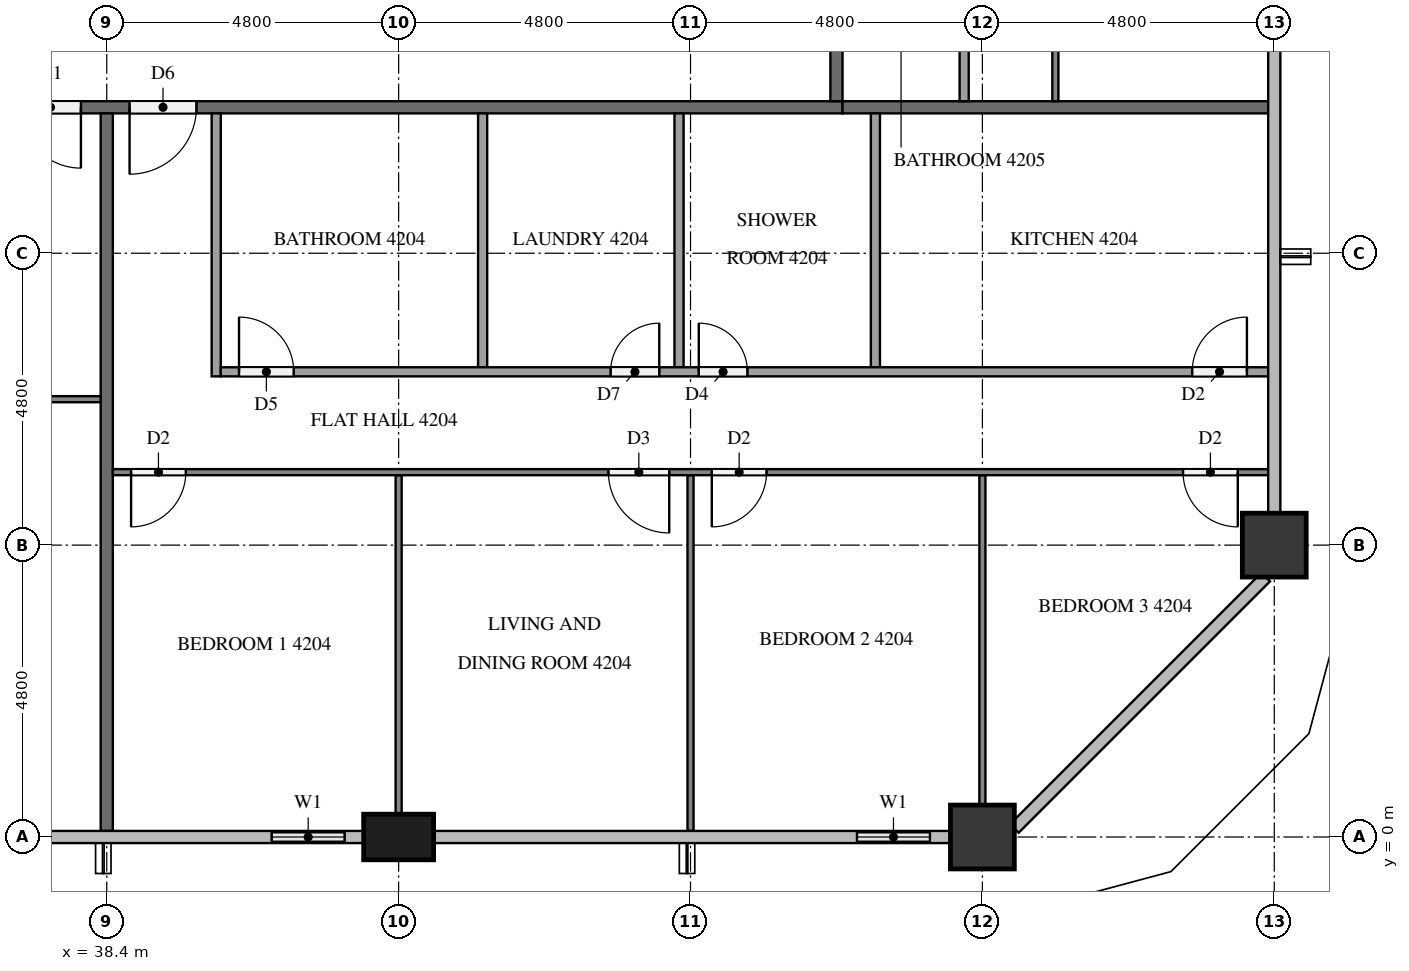
"""IFC4 building model, lengths in metres.
Left out: names, types, materials, properties, quantities, classifications, styles, units other than length and angle.
Written with IfcOpenShell. Run it as: python <this file> out.ifc"""

import sys

from ifc_helpers import new_model, si_unit, direction, frame, frame_2d, origin, origin_2d, place, context, subcontext, project, spatial, rectangle, extrude, element, fill, save


model = new_model("IFC4")
c1 = context("Model", 3, precision=1e-05, world=origin(), true_north=direction((0.0, 1.0)))
c2 = subcontext(c1, "Body", "Model", "MODEL_VIEW")
j1 = project(units=[si_unit("LENGTHUNIT", "METRE"), si_unit("PLANEANGLEUNIT", "RADIAN")], contexts=[c1])
p1 = place(None, origin())
s1 = spatial("IfcSite", under=j1, at=p1, CompositionType="ELEMENT")
p2 = place(p1, origin())
s2 = spatial("IfcBuilding", under=s1, at=p2, CompositionType="ELEMENT")
p3 = place(p2, frame((0.0, 0.0, 163.0)))
s3 = spatial("IfcBuildingStorey", under=s2, at=p3, CompositionType="ELEMENT", Elevation=163.0)
p4 = place(p3, frame((43.2, 0.0, 0.0), z_axis=(0.0, 0.0, 1.0), x_axis=(1.0, 0.0, 0.0)))
e1 = element("IfcColumn", 1, at=p4, inside=s3, PredefinedType="COLUMN", context=c2, shape_type="SweptSolid", body=[
    extrude(rectangle(XDim=1.15, YDim=0.75, at=origin_2d()), origin(), (0.0, 0.0, 1.0), 3.2),
])
for number, where, z_axis, x_axis in (
    (2, (52.8, 0.0, 0.0), (0.0, 0.0, 1.0), (1.0, 0.0, 0.0)),
    (3, (57.6, 4.8, 0.0), (0.0, 0.0, 1.0), (1.0, 0.0, 0.0)),
):
    element("IfcColumn", number, at=place(p3, frame(where, z_axis=z_axis, x_axis=x_axis)), inside=s3, PredefinedType="COLUMN", context=c2, shape_type="SweptSolid", body=[
        extrude(rectangle(XDim=1.05, YDim=1.05, at=origin_2d()), origin(), (0.0, 0.0, 1.0), 3.2),
    ])
p5 = place(p3, frame((40.8, 0.0, 0.0), z_axis=(0.0, 0.0, 1.0), x_axis=(1.0, 0.0, 0.0)))
e4 = element("IfcWall", 4, at=p5, inside=s3, PredefinedType="SOLIDWALL", context=c2, shape_type="SweptSolid", body=[
    extrude(rectangle(XDim=1.825, YDim=0.15, at=frame_2d((0.913, 0.0))), origin(), (0.0, 0.0, 1.0), 3.2),
])
p6 = place(p5, frame((0.312, 0.0, 0.9)))
e5 = element("IfcOpeningElement", 5, at=p6, cuts=e4, PredefinedType="OPENING", context=c2, shape_type="SweptSolid", body=[
    extrude(rectangle(XDim=1.2, YDim=1.4, at=frame_2d((0.6, 0.7))), frame((0.0, 0.085, 0.0), z_axis=(0.0, -1.0, 0.0), x_axis=(1.0, 0.0, 0.0)), (0.0, 0.0, 1.0), 0.17),
])
p7 = place(p3, frame((50.4, 0.0, 0.0), z_axis=(0.0, 0.0, 1.0), x_axis=(1.0, 0.0, 0.0)))
e6 = element("IfcWall", 6, at=p7, inside=s3, PredefinedType="SOLIDWALL", context=c2, shape_type="SweptSolid", body=[
    extrude(rectangle(XDim=1.875, YDim=0.15, at=frame_2d((0.938, 0.0))), origin(), (0.0, 0.0, 1.0), 3.2),
])
p8 = place(p7, frame((0.337, 0.0, 0.9)))
e7 = element("IfcOpeningElement", 7, at=p8, cuts=e6, PredefinedType="OPENING", context=c2, shape_type="SweptSolid", body=[
    extrude(rectangle(XDim=1.2, YDim=1.4, at=frame_2d((0.6, 0.7))), frame((0.0, 0.085, 0.0), z_axis=(0.0, -1.0, 0.0), x_axis=(1.0, 0.0, 0.0)), (0.0, 0.0, 1.0), 0.17),
])
p9 = place(p3, frame((50.5, 12.0, 0.0), z_axis=(0.0, 0.0, 1.0), x_axis=(-1.0, 0.0, 0.0)))
e8 = element("IfcWall", 8, at=p9, inside=s3, PredefinedType="PARTITIONING", context=c2, shape_type="SweptSolid", body=[
    extrude(rectangle(XDim=38.6, YDim=0.2, at=frame_2d((19.3, 0.0))), origin(), (0.0, 0.0, 1.0), 3.2),
])
p10 = place(p9, frame((34.125, 0.0, 0.0)))
e9 = element("IfcOpeningElement", 9, at=p10, cuts=e8, PredefinedType="OPENING", context=c2, shape_type="SweptSolid", body=[
    extrude(rectangle(XDim=1.0, YDim=2.1, at=frame_2d((0.5, 1.05))), frame((0.0, 0.11, 0.0), z_axis=(0.0, -1.0, 0.0), x_axis=(1.0, 0.0, 0.0)), (0.0, 0.0, 1.0), 0.22),
])
p11 = place(p9, frame((32.275, 0.0, 0.0)))
e10 = element("IfcOpeningElement", 10, at=p11, cuts=e8, PredefinedType="OPENING", context=c2, shape_type="SweptSolid", body=[
    extrude(rectangle(XDim=1.0, YDim=2.1, at=frame_2d((0.5, 1.05))), frame((0.0, 0.11, 0.0), z_axis=(0.0, -1.0, 0.0), x_axis=(1.0, 0.0, 0.0)), (0.0, 0.0, 1.0), 0.22),
])
p12 = place(p9, frame((12.525, 0.0, 0.0)))
e11 = element("IfcOpeningElement", 11, at=p12, cuts=e8, PredefinedType="OPENING", context=c2, shape_type="SweptSolid", body=[
    extrude(rectangle(XDim=1.0, YDim=2.1, at=frame_2d((0.5, 1.05))), frame((0.0, 0.11, 0.0), z_axis=(0.0, -1.0, 0.0), x_axis=(1.0, 0.0, 0.0)), (0.0, 0.0, 1.0), 0.22),
])
p13 = place(p9, frame((10.625, 0.0, 0.0)))
e12 = element("IfcOpeningElement", 12, at=p13, cuts=e8, PredefinedType="OPENING", context=c2, shape_type="SweptSolid", body=[
    extrude(rectangle(XDim=1.1, YDim=2.1, at=frame_2d((0.55, 1.05))), frame((0.0, 0.11, 0.0), z_axis=(0.0, -1.0, 0.0), x_axis=(1.0, 0.0, 0.0)), (0.0, 0.0, 1.0), 0.22),
])
p14 = place(p3, frame((50.4, 40.7, 0.0), z_axis=(0.0, 0.0, 1.0), x_axis=(0.0, -1.0, 0.0)))
e13 = element("IfcWall", 13, at=p14, inside=s3, PredefinedType="PARTITIONING", context=c2, shape_type="SweptSolid", body=[
    extrude(rectangle(XDim=28.6, YDim=0.2, at=frame_2d((14.3, 0.0))), origin(), (0.0, 0.0, 1.0), 3.2),
])
p15 = place(p14, frame((19.525, 0.0, 0.0)))
e14 = element("IfcOpeningElement", 14, at=p15, cuts=e13, PredefinedType="OPENING", context=c2, shape_type="SweptSolid", body=[
    extrude(rectangle(XDim=1.0, YDim=2.1, at=frame_2d((0.5, 1.05))), frame((0.0, 0.11, 0.0), z_axis=(0.0, -1.0, 0.0), x_axis=(1.0, 0.0, 0.0)), (0.0, 0.0, 1.0), 0.22),
])
p16 = place(p14, frame((17.675, 0.0, 0.0)))
e15 = element("IfcOpeningElement", 15, at=p16, cuts=e13, PredefinedType="OPENING", context=c2, shape_type="SweptSolid", body=[
    extrude(rectangle(XDim=1.0, YDim=2.1, at=frame_2d((0.5, 1.05))), frame((0.0, 0.11, 0.0), z_axis=(0.0, -1.0, 0.0), x_axis=(1.0, 0.0, 0.0)), (0.0, 0.0, 1.0), 0.22),
])
p17 = place(p14, frame((8.075, 0.0, 0.0)))
e16 = element("IfcOpeningElement", 16, at=p17, cuts=e13, PredefinedType="OPENING", context=c2, shape_type="SweptSolid", body=[
    extrude(rectangle(XDim=1.0, YDim=2.1, at=frame_2d((0.5, 1.05))), frame((0.0, 0.11, 0.0), z_axis=(0.0, -1.0, 0.0), x_axis=(1.0, 0.0, 0.0)), (0.0, 0.0, 1.0), 0.22),
])
p18 = place(p3, frame((38.4, 11.9, 0.0), z_axis=(0.0, 0.0, 1.0), x_axis=(0.0, -1.0, 0.0)))
e17 = element("IfcWall", 17, at=p18, inside=s3, PredefinedType="PARTITIONING", context=c2, shape_type="SweptSolid", body=[
    extrude(rectangle(XDim=11.8, YDim=0.2, at=frame_2d((5.9, 0.0))), origin(), (0.0, 0.0, 1.0), 3.2),
])
p19 = place(p3, frame((50.5, 12.0, 0.0), z_axis=(0.0, 0.0, 1.0), x_axis=(1.0, 0.0, 0.0)))
e18 = element("IfcWall", 18, at=p19, inside=s3, PredefinedType="PARTITIONING", context=c2, shape_type="SweptSolid", body=[
    extrude(rectangle(XDim=7.0, YDim=0.2, at=frame_2d((3.5, 0.0))), origin(), (0.0, 0.0, 1.0), 3.2),
])
p20 = place(p3, frame((38.3, 7.2, 0.0), z_axis=(0.0, 0.0, 1.0), x_axis=(-1.0, 0.0, 0.0)))
e19 = element("IfcWall", 19, at=p20, inside=s3, PredefinedType="PARTITIONING", context=c2, shape_type="SweptSolid", body=[
    extrude(rectangle(XDim=14.2, YDim=0.1, at=frame_2d((7.1, 0.0))), origin(), (0.0, 0.0, 1.0), 3.2),
])
p21 = place(p20, frame((3.45, 0.0, 0.0)))
e20 = element("IfcOpeningElement", 20, at=p21, cuts=e19, PredefinedType="OPENING", context=c2, shape_type="SweptSolid", body=[
    extrude(rectangle(XDim=0.9, YDim=2.1, at=frame_2d((0.45, 1.05))), frame((0.0, 0.06, 0.0), z_axis=(0.0, -1.0, 0.0), x_axis=(1.0, 0.0, 0.0)), (0.0, 0.0, 1.0), 0.12),
])
p22 = place(p20, frame((5.05, 0.0, 0.0)))
e21 = element("IfcOpeningElement", 21, at=p22, cuts=e19, PredefinedType="OPENING", context=c2, shape_type="SweptSolid", body=[
    extrude(rectangle(XDim=0.9, YDim=2.1, at=frame_2d((0.45, 1.05))), frame((0.0, 0.06, 0.0), z_axis=(0.0, -1.0, 0.0), x_axis=(1.0, 0.0, 0.0)), (0.0, 0.0, 1.0), 0.12),
])
p23 = place(p20, frame((12.9, 0.0, 0.0)))
e22 = element("IfcOpeningElement", 22, at=p23, cuts=e19, PredefinedType="OPENING", context=c2, shape_type="SweptSolid", body=[
    extrude(rectangle(XDim=1.0, YDim=2.1, at=frame_2d((0.5, 1.05))), frame((0.0, 0.06, 0.0), z_axis=(0.0, -1.0, 0.0), x_axis=(1.0, 0.0, 0.0)), (0.0, 0.0, 1.0), 0.12),
])
p24 = place(p3, frame((43.2, 5.95, 0.0), z_axis=(0.0, 0.0, 1.0), x_axis=(0.0, -1.0, 0.0)))
e23 = element("IfcWall", 23, at=p24, inside=s3, PredefinedType="PARTITIONING", context=c2, shape_type="SweptSolid", body=[
    extrude(rectangle(XDim=5.575, YDim=0.1, at=frame_2d((2.788, 0.0))), origin(), (0.0, 0.0, 1.0), 3.2),
])
p25 = place(p3, frame((48.0, 5.95, 0.0), z_axis=(0.0, 0.0, 1.0), x_axis=(0.0, -1.0, 0.0)))
e24 = element("IfcWall", 24, at=p25, inside=s3, PredefinedType="PARTITIONING", context=c2, shape_type="SweptSolid", body=[
    extrude(rectangle(XDim=5.85, YDim=0.1, at=frame_2d((2.925, 0.0))), origin(), (0.0, 0.0, 1.0), 3.2),
])
p26 = place(p3, frame((52.8, 5.95, 0.0), z_axis=(0.0, 0.0, 1.0), x_axis=(0.0, -1.0, 0.0)))
e25 = element("IfcWall", 25, at=p26, inside=s3, PredefinedType="PARTITIONING", context=c2, shape_type="SweptSolid", body=[
    extrude(rectangle(XDim=5.425, YDim=0.1, at=frame_2d((2.712, 0.0))), origin(), (0.0, 0.0, 1.0), 3.2),
])
p27 = place(p3, frame((57.5, 6.0, 0.0), z_axis=(0.0, 0.0, 1.0), x_axis=(-1.0, 0.0, 0.0)))
e26 = element("IfcWall", 26, at=p27, inside=s3, PredefinedType="PARTITIONING", context=c2, shape_type="SweptSolid", body=[
    extrude(rectangle(XDim=19.0, YDim=0.1, at=frame_2d((9.5, 0.0))), origin(), (0.0, 0.0, 1.0), 3.2),
])
p28 = place(p27, frame((17.8, 0.0, 0.0)))
e27 = element("IfcOpeningElement", 27, at=p28, cuts=e26, PredefinedType="OPENING", context=c2, shape_type="SweptSolid", body=[
    extrude(rectangle(XDim=0.9, YDim=2.1, at=frame_2d((0.45, 1.05))), frame((0.0, 0.06, 0.0), z_axis=(0.0, -1.0, 0.0), x_axis=(1.0, 0.0, 0.0)), (0.0, 0.0, 1.0), 0.12),
])
p29 = place(p27, frame((9.85, 0.0, 0.0)))
e28 = element("IfcOpeningElement", 28, at=p29, cuts=e26, PredefinedType="OPENING", context=c2, shape_type="SweptSolid", body=[
    extrude(rectangle(XDim=1.0, YDim=2.1, at=frame_2d((0.5, 1.05))), frame((0.0, 0.06, 0.0), z_axis=(0.0, -1.0, 0.0), x_axis=(1.0, 0.0, 0.0)), (0.0, 0.0, 1.0), 0.12),
])
p30 = place(p27, frame((8.25, 0.0, 0.0)))
e29 = element("IfcOpeningElement", 29, at=p30, cuts=e26, PredefinedType="OPENING", context=c2, shape_type="SweptSolid", body=[
    extrude(rectangle(XDim=0.9, YDim=2.1, at=frame_2d((0.45, 1.05))), frame((0.0, 0.06, 0.0), z_axis=(0.0, -1.0, 0.0), x_axis=(1.0, 0.0, 0.0)), (0.0, 0.0, 1.0), 0.12),
])
p31 = place(p27, frame((0.5, 0.0, 0.0)))
e30 = element("IfcOpeningElement", 30, at=p31, cuts=e26, PredefinedType="OPENING", context=c2, shape_type="SweptSolid", body=[
    extrude(rectangle(XDim=0.9, YDim=2.1, at=frame_2d((0.45, 1.05))), frame((0.0, 0.06, 0.0), z_axis=(0.0, -1.0, 0.0), x_axis=(1.0, 0.0, 0.0)), (0.0, 0.0, 1.0), 0.12),
])
for number, where, z_axis, x_axis in (
    (31, (44.581, 11.9, 0.0), (0.0, 0.0, 1.0), (0.0, -1.0, 0.0)),
    (32, (47.811, 11.9, 0.0), (0.0, 0.0, 1.0), (0.0, -1.0, 0.0)),
    (33, (51.041, 11.9, 0.0), (0.0, 0.0, 1.0), (0.0, -1.0, 0.0)),
):
    element("IfcWall", number, at=place(p3, frame(where, z_axis=z_axis, x_axis=x_axis)), inside=s3, PredefinedType="PARTITIONING", context=c2, shape_type="SweptSolid", body=[
        extrude(rectangle(XDim=4.175, YDim=0.15, at=frame_2d((2.087, 0.0))), origin(), (0.0, 0.0, 1.0), 3.2),
    ])
p32 = place(p3, frame((40.2, 11.9, 0.0), z_axis=(0.0, 0.0, 1.0), x_axis=(0.0, -1.0, 0.0)))
e34 = element("IfcWall", 34, at=p32, inside=s3, PredefinedType="PARTITIONING", context=c2, shape_type="SweptSolid", body=[
    extrude(rectangle(XDim=4.325, YDim=0.15, at=frame_2d((2.163, 0.0))), origin(), (0.0, 0.0, 1.0), 3.2),
])
p33 = place(p3, frame((40.275, 7.65, 0.0), z_axis=(0.0, 0.0, 1.0), x_axis=(1.0, 0.0, 0.0)))
e35 = element("IfcWall", 35, at=p33, inside=s3, PredefinedType="PARTITIONING", context=c2, shape_type="SweptSolid", body=[
    extrude(rectangle(XDim=17.225, YDim=0.15, at=frame_2d((8.613, 0.0))), origin(), (0.0, 0.0, 1.0), 3.2),
])
p34 = place(p33, frame((0.3, 0.0, 0.0)))
e36 = element("IfcOpeningElement", 36, at=p34, cuts=e35, PredefinedType="OPENING", context=c2, shape_type="SweptSolid", body=[
    extrude(rectangle(XDim=0.9, YDim=2.1, at=frame_2d((0.45, 1.05))), frame((0.0, 0.085, 0.0), z_axis=(0.0, -1.0, 0.0), x_axis=(1.0, 0.0, 0.0)), (0.0, 0.0, 1.0), 0.17),
])
p35 = place(p33, frame((6.411, 0.0, 0.0)))
e37 = element("IfcOpeningElement", 37, at=p35, cuts=e35, PredefinedType="OPENING", context=c2, shape_type="SweptSolid", body=[
    extrude(rectangle(XDim=0.8, YDim=2.1, at=frame_2d((0.4, 1.05))), frame((0.0, 0.085, 0.0), z_axis=(0.0, -1.0, 0.0), x_axis=(1.0, 0.0, 0.0)), (0.0, 0.0, 1.0), 0.17),
])
p36 = place(p33, frame((7.861, 0.0, 0.0)))
e38 = element("IfcOpeningElement", 38, at=p36, cuts=e35, PredefinedType="OPENING", context=c2, shape_type="SweptSolid", body=[
    extrude(rectangle(XDim=0.8, YDim=2.1, at=frame_2d((0.4, 1.05))), frame((0.0, 0.085, 0.0), z_axis=(0.0, -1.0, 0.0), x_axis=(1.0, 0.0, 0.0)), (0.0, 0.0, 1.0), 0.17),
])
p37 = place(p33, frame((15.975, 0.0, 0.0)))
e39 = element("IfcOpeningElement", 39, at=p37, cuts=e35, PredefinedType="OPENING", context=c2, shape_type="SweptSolid", body=[
    extrude(rectangle(XDim=0.9, YDim=2.1, at=frame_2d((0.45, 1.05))), frame((0.0, 0.085, 0.0), z_axis=(0.0, -1.0, 0.0), x_axis=(1.0, 0.0, 0.0)), (0.0, 0.0, 1.0), 0.17),
])
p38 = place(p3, frame((54.0, 21.5, 0.0), z_axis=(0.0, 0.0, 1.0), x_axis=(0.0, -1.0, 0.0)))
e40 = element("IfcWall", 40, at=p38, inside=s3, PredefinedType="PARTITIONING", context=c2, shape_type="SweptSolid", body=[
    extrude(rectangle(XDim=9.4, YDim=0.1, at=frame_2d((4.7, 0.0))), origin(), (0.0, 0.0, 1.0), 3.2),
])
p39 = place(p38, frame((3.35, 0.0, 0.0)))
e41 = element("IfcOpeningElement", 41, at=p39, cuts=e40, PredefinedType="OPENING", context=c2, shape_type="SweptSolid", body=[
    extrude(rectangle(XDim=1.0, YDim=2.1, at=frame_2d((0.5, 1.05))), frame((0.0, 0.06, 0.0), z_axis=(0.0, -1.0, 0.0), x_axis=(1.0, 0.0, 0.0)), (0.0, 0.0, 1.0), 0.12),
])
p40 = place(p38, frame((5.05, 0.0, 0.0)))
e42 = element("IfcOpeningElement", 42, at=p40, cuts=e40, PredefinedType="OPENING", context=c2, shape_type="SweptSolid", body=[
    extrude(rectangle(XDim=0.9, YDim=2.1, at=frame_2d((0.45, 1.05))), frame((0.0, 0.06, 0.0), z_axis=(0.0, -1.0, 0.0), x_axis=(1.0, 0.0, 0.0)), (0.0, 0.0, 1.0), 0.12),
])
p41 = place(p3, frame((52.5, 12.1, 0.0), z_axis=(0.0, 0.0, 1.0), x_axis=(0.0, 1.0, 0.0)))
e43 = element("IfcWall", 43, at=p41, inside=s3, PredefinedType="PARTITIONING", context=c2, shape_type="SweptSolid", body=[
    extrude(rectangle(XDim=7.625, YDim=0.15, at=frame_2d((3.812, 0.0))), origin(), (0.0, 0.0, 1.0), 3.2),
])
p42 = place(p41, frame((3.375, 0.0, 0.0)))
e44 = element("IfcOpeningElement", 44, at=p42, cuts=e43, PredefinedType="OPENING", context=c2, shape_type="SweptSolid", body=[
    extrude(rectangle(XDim=0.9, YDim=2.1, at=frame_2d((0.45, 1.05))), frame((0.0, 0.085, 0.0), z_axis=(0.0, -1.0, 0.0), x_axis=(1.0, 0.0, 0.0)), (0.0, 0.0, 1.0), 0.17),
])
p43 = place(p41, frame((1.925, 0.0, 0.0)))
e45 = element("IfcOpeningElement", 45, at=p43, cuts=e43, PredefinedType="OPENING", context=c2, shape_type="SweptSolid", body=[
    extrude(rectangle(XDim=0.8, YDim=2.1, at=frame_2d((0.4, 1.05))), frame((0.0, 0.085, 0.0), z_axis=(0.0, -1.0, 0.0), x_axis=(1.0, 0.0, 0.0)), (0.0, 0.0, 1.0), 0.17),
])
p44 = place(p6, origin())
e46 = element("IfcWindow", 46, at=p44, inside=s3, PartitioningType="SINGLE_PANEL", PredefinedType="WINDOW", context=c2, shape_type="SweptSolid", body=[
    extrude(rectangle(XDim=1.2, YDim=1.4, at=frame_2d((0.6, 0.7))), frame((0.0, 0.03, 0.0), z_axis=(0.0, -1.0, 0.0), x_axis=(1.0, 0.0, 0.0)), (0.0, 0.0, 1.0), 0.06),
])
fill(e5, e46)
p45 = place(p8, origin())
e47 = element("IfcWindow", 47, at=p45, inside=s3, PartitioningType="SINGLE_PANEL", PredefinedType="WINDOW", context=c2, shape_type="SweptSolid", body=[
    extrude(rectangle(XDim=1.2, YDim=1.4, at=frame_2d((0.6, 0.7))), frame((0.0, 0.03, 0.0), z_axis=(0.0, -1.0, 0.0), x_axis=(1.0, 0.0, 0.0)), (0.0, 0.0, 1.0), 0.06),
])
fill(e7, e47)
p46 = place(p12, origin())
e48 = element("IfcDoor", 48, at=p46, inside=s3, OperationType="SINGLE_SWING_LEFT", PredefinedType="DOOR", context=c2, shape_type="SweptSolid", body=[
    extrude(rectangle(XDim=1.0, YDim=2.1, at=frame_2d((0.5, 1.05))), frame((0.0, 0.025, 0.0), z_axis=(0.0, -1.0, 0.0), x_axis=(1.0, 0.0, 0.0)), (0.0, 0.0, 1.0), 0.05),
])
fill(e11, e48)
p47 = place(p13, origin())
e49 = element("IfcDoor", 49, at=p47, inside=s3, OperationType="SINGLE_SWING_RIGHT", PredefinedType="DOOR", context=c2, shape_type="SweptSolid", body=[
    extrude(rectangle(XDim=1.1, YDim=2.1, at=frame_2d((0.55, 1.05))), frame((0.0, 0.025, 0.0), z_axis=(0.0, -1.0, 0.0), x_axis=(1.0, 0.0, 0.0)), (0.0, 0.0, 1.0), 0.05),
])
fill(e12, e49)
p48 = place(p28, origin())
e50 = element("IfcDoor", 50, at=p48, inside=s3, OperationType="SINGLE_SWING_RIGHT", PredefinedType="DOOR", context=c2, shape_type="SweptSolid", body=[
    extrude(rectangle(XDim=0.9, YDim=2.1, at=frame_2d((0.45, 1.05))), frame((0.0, 0.025, 0.0), z_axis=(0.0, -1.0, 0.0), x_axis=(1.0, 0.0, 0.0)), (0.0, 0.0, 1.0), 0.05),
])
fill(e27, e50)
p49 = place(p29, origin())
e51 = element("IfcDoor", 51, at=p49, inside=s3, OperationType="SINGLE_SWING_LEFT", PredefinedType="DOOR", context=c2, shape_type="SweptSolid", body=[
    extrude(rectangle(XDim=1.0, YDim=2.1, at=frame_2d((0.5, 1.05))), frame((0.0, 0.025, 0.0), z_axis=(0.0, -1.0, 0.0), x_axis=(1.0, 0.0, 0.0)), (0.0, 0.0, 1.0), 0.05),
])
fill(e28, e51)
p50 = place(p30, origin())
e52 = element("IfcDoor", 52, at=p50, inside=s3, OperationType="SINGLE_SWING_RIGHT", PredefinedType="DOOR", context=c2, shape_type="SweptSolid", body=[
    extrude(rectangle(XDim=0.9, YDim=2.1, at=frame_2d((0.45, 1.05))), frame((0.0, 0.025, 0.0), z_axis=(0.0, -1.0, 0.0), x_axis=(1.0, 0.0, 0.0)), (0.0, 0.0, 1.0), 0.05),
])
fill(e29, e52)
p51 = place(p31, origin())
e53 = element("IfcDoor", 53, at=p51, inside=s3, OperationType="SINGLE_SWING_LEFT", PredefinedType="DOOR", context=c2, shape_type="SweptSolid", body=[
    extrude(rectangle(XDim=0.9, YDim=2.1, at=frame_2d((0.45, 1.05))), frame((0.0, 0.025, 0.0), z_axis=(0.0, -1.0, 0.0), x_axis=(1.0, 0.0, 0.0)), (0.0, 0.0, 1.0), 0.05),
])
fill(e30, e53)
p52 = place(p34, origin())
e54 = element("IfcDoor", 54, at=p52, inside=s3, OperationType="SINGLE_SWING_LEFT", PredefinedType="DOOR", context=c2, shape_type="SweptSolid", body=[
    extrude(rectangle(XDim=0.9, YDim=2.1, at=frame_2d((0.45, 1.05))), frame((0.0, 0.025, 0.0), z_axis=(0.0, -1.0, 0.0), x_axis=(1.0, 0.0, 0.0)), (0.0, 0.0, 1.0), 0.05),
])
fill(e36, e54)
p53 = place(p35, origin())
e55 = element("IfcDoor", 55, at=p53, inside=s3, OperationType="SINGLE_SWING_RIGHT", PredefinedType="DOOR", context=c2, shape_type="SweptSolid", body=[
    extrude(rectangle(XDim=0.8, YDim=2.1, at=frame_2d((0.4, 1.05))), frame((0.0, 0.025, 0.0), z_axis=(0.0, -1.0, 0.0), x_axis=(1.0, 0.0, 0.0)), (0.0, 0.0, 1.0), 0.05),
])
fill(e37, e55)
p54 = place(p36, origin())
e56 = element("IfcDoor", 56, at=p54, inside=s3, OperationType="SINGLE_SWING_LEFT", PredefinedType="DOOR", context=c2, shape_type="SweptSolid", body=[
    extrude(rectangle(XDim=0.8, YDim=2.1, at=frame_2d((0.4, 1.05))), frame((0.0, 0.025, 0.0), z_axis=(0.0, -1.0, 0.0), x_axis=(1.0, 0.0, 0.0)), (0.0, 0.0, 1.0), 0.05),
])
fill(e38, e56)
p55 = place(p37, origin())
e57 = element("IfcDoor", 57, at=p55, inside=s3, OperationType="SINGLE_SWING_RIGHT", PredefinedType="DOOR", context=c2, shape_type="SweptSolid", body=[
    extrude(rectangle(XDim=0.9, YDim=2.1, at=frame_2d((0.45, 1.05))), frame((0.0, 0.025, 0.0), z_axis=(0.0, -1.0, 0.0), x_axis=(1.0, 0.0, 0.0)), (0.0, 0.0, 1.0), 0.05),
])
fill(e39, e57)
save(model, sys.argv[1])
